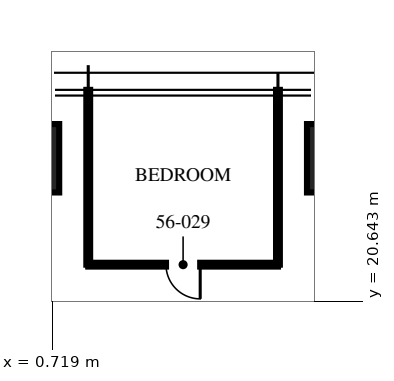
"""IFC4 building model, lengths in metres.
Left out: names, types, materials, properties, quantities, classifications, styles, units other than length and angle.
Written with IfcOpenShell. Run it as: python <this file> out.ifc"""

import sys

from ifc_helpers import new_model, si_unit, direction, frame, frame_2d, origin, origin_2d, place, context, subcontext, project, spatial, rectangle, extrude, element, fill, save


model = new_model("IFC4")
c1 = context("Model", 3, precision=1e-05, world=origin(), true_north=direction((0.0, 1.0)))
c2 = subcontext(c1, "Body", "Model", "MODEL_VIEW")
j1 = project(units=[si_unit("LENGTHUNIT", "METRE"), si_unit("PLANEANGLEUNIT", "RADIAN")], contexts=[c1])
p1 = place(None, origin())
s1 = spatial("IfcSite", under=j1, at=p1, CompositionType="ELEMENT")
p2 = place(p1, origin())
s2 = spatial("IfcBuilding", under=s1, at=p2, CompositionType="ELEMENT")
p3 = place(p2, frame((0.0, 0.0, 225.75)))
s3 = spatial("IfcBuildingStorey", under=s2, at=p3, CompositionType="ELEMENT", Elevation=225.75)
for number, where, z_axis, x_axis in (
    (1, (0.0, 24.4, 0.0), (0.0, 0.0, 1.0), (1.0, 0.0, 0.0)),
    (2, (8.32, 24.4, 0.0), (0.0, 0.0, 1.0), (1.0, 0.0, 0.0)),
):
    element("IfcColumn", number, at=place(p3, frame(where, z_axis=z_axis, x_axis=x_axis)), inside=s3, PredefinedType="COLUMN", context=c2, shape_type="SweptSolid", body=[
        extrude(rectangle(XDim=1.8, YDim=1.8, at=origin_2d()), origin(), (0.0, 0.0, 1.0), 3.75),
    ])
for number, where, z_axis, x_axis in (
    (3, (6.656, 21.6, 0.0), (0.0, 0.0, 1.0), (0.0, 1.0, 0.0)),
    (4, (1.664, 21.6, 0.0), (0.0, 0.0, 1.0), (0.0, 1.0, 0.0)),
):
    element("IfcWall", number, at=place(p3, frame(where, z_axis=z_axis, x_axis=x_axis)), inside=s3, PredefinedType="PARTITIONING", context=c2, shape_type="SweptSolid", body=[
        extrude(rectangle(XDim=4.6, YDim=0.1, at=frame_2d((2.3, 0.0))), origin(), (0.0, 0.0, 1.0), 2.91),
    ])
p4 = place(p3, frame((6.656, 21.6, 0.0), z_axis=(0.0, 0.0, 1.0), x_axis=(-1.0, 0.0, 0.0)))
e5 = element("IfcWall", 5, at=p4, inside=s3, PredefinedType="PARTITIONING", context=c2, shape_type="SweptSolid", body=[
    extrude(rectangle(XDim=4.992, YDim=0.1, at=frame_2d((2.496, 0.0))), origin(), (0.0, 0.0, 1.0), 2.81),
])
p5 = place(p4, frame((2.046, 0.0, 0.0)))
e6 = element("IfcOpeningElement", 6, at=p5, cuts=e5, PredefinedType="OPENING", context=c2, shape_type="SweptSolid", body=[
    extrude(rectangle(XDim=0.9, YDim=2.1, at=frame_2d((0.45, 1.05))), frame((0.0, 0.06, 0.0), z_axis=(0.0, -1.0, 0.0), x_axis=(1.0, 0.0, 0.0)), (0.0, 0.0, 1.0), 0.12),
])
p6 = place(p5, origin())
e7 = element("IfcDoor", 7, at=p6, inside=s3, OperationType="SINGLE_SWING_LEFT", PredefinedType="DOOR", context=c2, shape_type="SweptSolid", body=[
    extrude(rectangle(XDim=0.9, YDim=2.1, at=frame_2d((0.45, 1.05))), frame((0.0, 0.025, 0.0), z_axis=(0.0, -1.0, 0.0), x_axis=(1.0, 0.0, 0.0)), (0.0, 0.0, 1.0), 0.05),
])
fill(e6, e7)
save(model, sys.argv[1])
